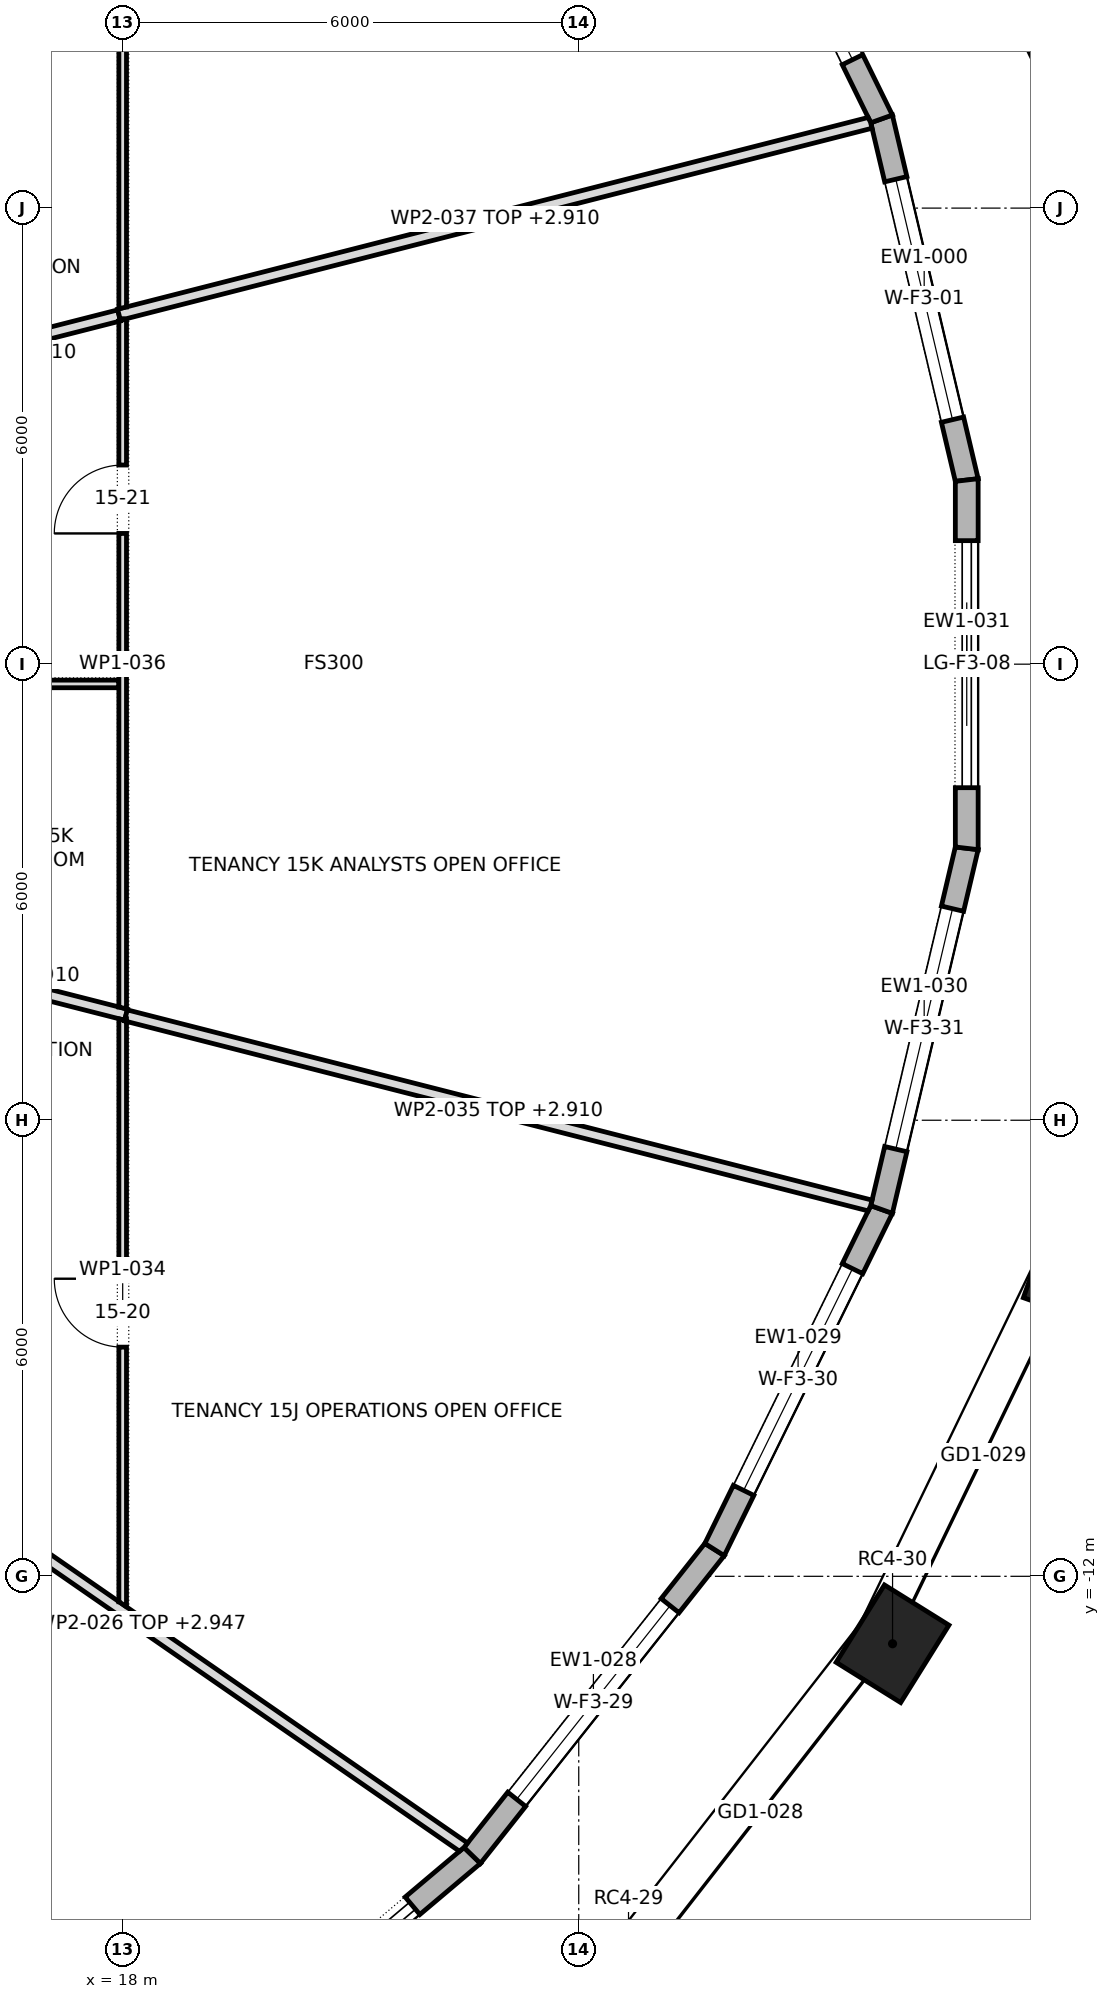
"""IFC4 building model, lengths in metres.
Left out: names, types, materials, properties, quantities, classifications, styles, units other than length and angle.
Written with IfcOpenShell. Run it as: python <this file> out.ifc"""

import sys

from ifc_helpers import new_model, si_unit, direction, frame, frame_2d, origin, origin_2d, place, context, subcontext, project, spatial, polyline, rectangle, outline, extrude, element, fill, save


model = new_model("IFC4")
c1 = context("Model", 3, precision=1e-05, world=origin(), true_north=direction((0.0, 1.0)))
c2 = subcontext(c1, "Body", "Model", "MODEL_VIEW")
j1 = project(units=[si_unit("LENGTHUNIT", "METRE"), si_unit("PLANEANGLEUNIT", "RADIAN")], contexts=[c1])
p1 = place(None, origin())
s1 = spatial("IfcSite", under=j1, at=p1, CompositionType="ELEMENT")
p2 = place(p1, origin())
s2 = spatial("IfcBuilding", under=s1, at=p2, CompositionType="ELEMENT")
p3 = place(p2, frame((0.0, 0.0, 214.9)))
s3 = spatial("IfcBuildingStorey", under=s2, at=p3, CompositionType="ELEMENT", Elevation=214.9)
for number, where, z_axis, x_axis in (
    (1, (30.521, 7.936, 0.0), (0.0, 0.0, 1.0), (-0.334, 0.943, 0.0)),
    (2, (28.129, -12.887, 0.0), (0.0, 0.0, 1.0), (0.529, 0.849, 0.0)),
    (3, (30.521, -7.936, 0.0), (0.0, 0.0, 1.0), (0.334, 0.943, 0.0)),
):
    element("IfcColumn", number, at=place(p3, frame(where, z_axis=z_axis, x_axis=x_axis)), inside=s3, PredefinedType="COLUMN", context=c2, shape_type="SweptSolid", body=[
        extrude(rectangle(XDim=1.2, YDim=1.0, at=origin_2d()), origin(), (0.0, 0.0, 1.0), 4.0),
    ])
p4 = place(p3, frame((29.104, 2.423, 0.0), z_axis=(0.0, 0.0, 1.0), x_axis=(-0.229546618766, 0.97329766763, 0.0)))
e4 = element("IfcWall", 4, at=p4, inside=s3, PredefinedType="STANDARD", context=c2, shape_type="SweptSolid", body=[
    extrude(outline(polyline([(-0.017, -0.15), (4.899, -0.15), (4.865, 0.15), (0.017, 0.15), (-0.017, -0.15)])), origin(), (0.0, 0.0, 1.0), 3.7),
])
p5 = place(p4, frame((0.816, 0.0, 0.6)))
e5 = element("IfcOpeningElement", 5, at=p5, cuts=e4, PredefinedType="OPENING", context=c2, shape_type="SweptSolid", body=[
    extrude(rectangle(XDim=3.25, YDim=2.65, at=frame_2d((1.625, 1.325))), frame((0.0, 0.162, 0.0), z_axis=(0.0, -1.0, 0.0), x_axis=(1.0, 0.0, 0.0)), (0.0, 0.0, 1.0), 0.324),
])
p6 = place(p3, frame((27.984, 7.174, 0.0), z_axis=(0.0, 0.0, 1.0), x_axis=(-0.440795186599, 0.897607711348, 0.0)))
e6 = element("IfcWall", 6, at=p6, inside=s3, PredefinedType="STANDARD", context=c2, shape_type="SweptSolid", body=[
    extrude(outline(polyline([(-0.017, -0.15), (5.0, -0.15), (4.968, 0.15), (0.017, 0.15), (-0.017, -0.15)])), origin(), (0.0, 0.0, 1.0), 3.7),
])
p7 = place(p6, frame((0.867, 0.0, 0.6)))
e7 = element("IfcOpeningElement", 7, at=p7, cuts=e6, PredefinedType="OPENING", context=c2, shape_type="SweptSolid", body=[
    extrude(rectangle(XDim=3.25, YDim=2.65, at=frame_2d((1.625, 1.325))), frame((0.0, 0.162, 0.0), z_axis=(0.0, -1.0, 0.0), x_axis=(1.0, 0.0, 0.0)), (0.0, 0.0, 1.0), 0.324),
])
p8 = place(p3, frame((18.543, -19.092, 0.0), z_axis=(0.0, 0.0, 1.0), x_axis=(0.764397795062, 0.644744919255, 0.0)))
e8 = element("IfcWall", 8, at=p8, inside=s3, PredefinedType="STANDARD", context=c2, shape_type="SweptSolid", body=[
    extrude(outline(polyline([(-0.014, -0.15), (5.32, -0.15), (5.29, 0.15), (0.014, 0.15), (-0.014, -0.15)])), origin(), (0.0, 0.0, 1.0), 3.7),
])
p9 = place(p8, frame((1.028, 0.0, 0.0)))
e9 = element("IfcOpeningElement", 9, at=p9, cuts=e8, PredefinedType="OPENING", context=c2, shape_type="SweptSolid", body=[
    extrude(rectangle(XDim=3.25, YDim=3.25, at=frame_2d((1.625, 1.625))), frame((0.0, 0.162, 0.0), z_axis=(0.0, -1.0, 0.0), x_axis=(1.0, 0.0, 0.0)), (0.0, 0.0, 1.0), 0.324),
])
p10 = place(p3, frame((22.599, -15.672, 0.0), z_axis=(0.0, 0.0, 1.0), x_axis=(0.621017151557, 0.783796974651, 0.0)))
e10 = element("IfcWall", 10, at=p10, inside=s3, PredefinedType="STANDARD", context=c2, shape_type="SweptSolid", body=[
    extrude(outline(polyline([(-0.015, -0.15), (5.15, -0.15), (5.118, 0.15), (0.015, 0.15), (-0.015, -0.15)])), origin(), (0.0, 0.0, 1.0), 3.7),
])
p11 = place(p10, frame((0.942, 0.0, 0.6)))
e11 = element("IfcOpeningElement", 11, at=p11, cuts=e10, PredefinedType="OPENING", context=c2, shape_type="SweptSolid", body=[
    extrude(rectangle(XDim=3.25, YDim=2.65, at=frame_2d((1.625, 1.325))), frame((0.0, 0.162, 0.0), z_axis=(0.0, -1.0, 0.0), x_axis=(1.0, 0.0, 0.0)), (0.0, 0.0, 1.0), 0.324),
])
p12 = place(p3, frame((25.787, -11.648, 0.0), z_axis=(0.0, 0.0, 1.0), x_axis=(0.440795186599, 0.897607711348, 0.0)))
e12 = element("IfcWall", 12, at=p12, inside=s3, PredefinedType="STANDARD", context=c2, shape_type="SweptSolid", body=[
    extrude(outline(polyline([(-0.016, -0.15), (5.001, -0.15), (4.967, 0.15), (0.016, 0.15), (-0.016, -0.15)])), origin(), (0.0, 0.0, 1.0), 3.7),
])
p13 = place(p12, frame((0.867, 0.0, 0.6)))
e13 = element("IfcOpeningElement", 13, at=p13, cuts=e12, PredefinedType="OPENING", context=c2, shape_type="SweptSolid", body=[
    extrude(rectangle(XDim=3.25, YDim=2.65, at=frame_2d((1.625, 1.325))), frame((0.0, 0.162, 0.0), z_axis=(0.0, -1.0, 0.0), x_axis=(1.0, 0.0, 0.0)), (0.0, 0.0, 1.0), 0.324),
])
p14 = place(p3, frame((27.984, -7.174, 0.0), z_axis=(0.0, 0.0, 1.0), x_axis=(0.229546618766, 0.97329766763, 0.0)))
e14 = element("IfcWall", 14, at=p14, inside=s3, PredefinedType="STANDARD", context=c2, shape_type="SweptSolid", body=[
    extrude(outline(polyline([(-0.017, -0.15), (4.899, -0.15), (4.865, 0.15), (0.017, 0.15), (-0.017, -0.15)])), origin(), (0.0, 0.0, 1.0), 3.7),
])
p15 = place(p14, frame((0.816, 0.0, 0.6)))
e15 = element("IfcOpeningElement", 15, at=p15, cuts=e14, PredefinedType="OPENING", context=c2, shape_type="SweptSolid", body=[
    extrude(rectangle(XDim=3.25, YDim=2.65, at=frame_2d((1.625, 1.325))), frame((0.0, 0.162, 0.0), z_axis=(0.0, -1.0, 0.0), x_axis=(1.0, 0.0, 0.0)), (0.0, 0.0, 1.0), 0.324),
])
p16 = place(p3, frame((29.104, -2.423, 0.0), z_axis=(0.0, 0.0, 1.0), x_axis=(0.0, 1.0, 0.0)))
e16 = element("IfcWall", 16, at=p16, inside=s3, PredefinedType="STANDARD", context=c2, shape_type="SweptSolid", body=[
    extrude(outline(polyline([(-0.017, -0.15), (4.863, -0.15), (4.828, 0.15), (0.017, 0.15), (-0.017, -0.15)])), origin(), (0.0, 0.0, 1.0), 3.7),
])
p17 = place(p16, frame((0.798, 0.0, 0.0)))
e17 = element("IfcOpeningElement", 17, at=p17, cuts=e16, PredefinedType="OPENING", context=c2, shape_type="SweptSolid", body=[
    extrude(rectangle(XDim=3.25, YDim=3.25, at=frame_2d((1.625, 1.625))), frame((0.0, 0.162, 0.0), z_axis=(0.0, -1.0, 0.0), x_axis=(1.0, 0.0, 0.0)), (0.0, 0.0, 1.0), 0.324),
])
p18 = place(p3, frame((13.968, -9.667, 0.0), z_axis=(0.0, 0.0, 1.0), x_axis=(0.822219313141, -0.56917080134, 0.0)))
e18 = element("IfcWall", 18, at=p18, inside=s3, PredefinedType="PARTITIONING", context=c2, shape_type="SweptSolid", body=[
    extrude(outline(polyline([(0.0, -0.075), (1.724, -0.075), (3.448, -0.075), (5.173, -0.075), (6.897, -0.075), (8.621, -0.075), (10.345, -0.075), (10.365, 0.0), (10.37, 0.066), (10.37, 0.075), (8.511, 0.075), (6.653, 0.075), (4.795, 0.075), (4.792, 0.073), (4.791, 0.075), (3.22, 0.075), (1.65, 0.075), (0.079, 0.075), (0.039, -0.0), (0.0, -0.075)])), origin(), (0.0, 0.0, 1.0), 2.947),
])
p19 = place(p3, frame((14.042, -3.591, 0.0), z_axis=(0.0, 0.0, 1.0), x_axis=(0.968991510142, -0.247094017071, 0.0)))
e19 = element("IfcWall", 19, at=p19, inside=s3, PredefinedType="PARTITIONING", context=c2, shape_type="SweptSolid", body=[
    extrude(outline(polyline([(4.131, 0.075), (4.015, 0.075), (4.014, 0.075), (4.014, 0.075), (2.676, 0.075), (1.338, 0.075), (0.0, 0.075), (0.0, 0.074), (0.015, 0.015), (0.03, 0.019), (0.053, -0.075), (1.413, -0.075), (2.772, -0.075), (4.131, -0.075), (4.131, 0.075)])), origin(), (0.0, 0.0, 1.0), 2.91),
])
p20 = place(p3, frame((14.061, -0.26, 0.0), z_axis=(0.0, 0.0, 1.0), x_axis=(1.0, 0.0, 0.0)))
e20 = element("IfcWall", 20, at=p20, inside=s3, PredefinedType="PARTITIONING", context=c2, shape_type="SweptSolid", body=[
    extrude(outline(polyline([(3.889, 0.05), (1.952, 0.05), (0.014, 0.05), (0.014, 0.0), (0.0, 0.0), (0.0, -0.05), (1.945, -0.05), (3.889, -0.05), (3.889, 0.05)])), origin(), (0.0, 0.0, 1.0), 3.7),
])
p21 = place(p3, frame((14.057, 3.594, 0.0), z_axis=(0.0, 0.0, 1.0), x_axis=(0.968992302027, 0.247090911634, 0.0)))
e21 = element("IfcWall", 21, at=p21, inside=s3, PredefinedType="PARTITIONING", context=c2, shape_type="SweptSolid", body=[
    extrude(outline(polyline([(0.0, -0.075), (2.0, -0.075), (3.999, -0.075), (3.999, -0.073), (4.005, -0.075), (4.021, -0.075), (4.021, 0.075), (2.029, 0.075), (0.038, 0.075), (0.0, -0.074), (0.0, -0.075)])), origin(), (0.0, 0.0, 1.0), 2.91),
])
p22 = place(p3, frame((18.0, -4.665, 0.0), z_axis=(0.0, 0.0, 1.0), x_axis=(0.0, -1.0, 0.0)))
e22 = element("IfcWall", 22, at=p22, inside=s3, PredefinedType="PARTITIONING", context=c2, shape_type="SweptSolid", body=[
    extrude(outline(polyline([(0.0, -0.05), (1.917, -0.05), (3.834, -0.05), (5.751, -0.05), (7.668, -0.05), (7.737, 0.05), (7.737, 0.05), (5.812, 0.05), (3.886, 0.05), (1.961, 0.05), (0.035, 0.05), (0.029, 0.025), (0.0, 0.032), (0.0, 0.031), (0.019, 0.026), (0.0, -0.048), (0.0, -0.05)])), origin(), (0.0, 0.0, 1.0), 3.7),
])
p23 = place(p22, frame((3.42, 0.0, 0.0)))
e23 = element("IfcOpeningElement", 23, at=p23, cuts=e22, PredefinedType="OPENING", context=c2, shape_type="SweptSolid", body=[
    extrude(rectangle(XDim=0.9, YDim=2.1, at=frame_2d((0.45, 1.05))), frame((0.0, 0.062, 0.0), z_axis=(0.0, -1.0, 0.0), x_axis=(1.0, 0.0, 0.0)), (0.0, 0.0, 1.0), 0.124),
])
p24 = place(p3, frame((18.042, -4.621, 0.0), z_axis=(0.0, 0.0, 1.0), x_axis=(0.968898746972, -0.247457507698, 0.0)))
e24 = element("IfcWall", 24, at=p24, inside=s3, PredefinedType="PARTITIONING", context=c2, shape_type="SweptSolid", body=[
    extrude(outline(polyline([(0.027, -0.075), (1.706, -0.075), (3.385, -0.075), (5.063, -0.075), (6.741, -0.075), (8.42, -0.075), (10.098, -0.075), (10.113, -0.008), (10.113, 0.075), (8.427, 0.075), (6.742, 0.075), (5.056, 0.075), (3.371, 0.075), (1.686, 0.075), (0.0, 0.075), (0.0, -0.045), (0.019, -0.041), (0.027, -0.075)])), origin(), (0.0, 0.0, 1.0), 2.91),
])
p25 = place(p3, frame((18.0, -4.535, 0.0), z_axis=(0.0, 0.0, 1.0), x_axis=(0.0, 1.0, 0.0)))
e25 = element("IfcWall", 25, at=p25, inside=s3, PredefinedType="PARTITIONING", context=c2, shape_type="SweptSolid", body=[
    extrude(outline(polyline([(9.08, -0.05), (9.08, -0.048), (9.06, 0.03), (9.08, 0.035), (9.08, 0.036), (9.05, 0.029), (9.045, 0.05), (7.471, 0.05), (5.898, 0.05), (4.325, 0.05), (4.325, 0.05), (4.225, 0.05), (4.225, 0.05), (2.825, 0.05), (1.425, 0.05), (0.025, 0.05), (0.0, -0.048), (0.0, -0.05), (1.816, -0.05), (3.632, -0.05), (5.448, -0.05), (7.264, -0.05), (9.08, -0.05)])), origin(), (0.0, 0.0, 1.0), 3.7),
])
p26 = place(p25, frame((6.255, 0.0, 0.0)))
e26 = element("IfcOpeningElement", 26, at=p26, cuts=e25, PredefinedType="OPENING", context=c2, shape_type="SweptSolid", body=[
    extrude(rectangle(XDim=0.9, YDim=2.1, at=frame_2d((0.45, 1.05))), frame((0.0, 0.062, 0.0), z_axis=(0.0, -1.0, 0.0), x_axis=(1.0, 0.0, 0.0)), (0.0, 0.0, 1.0), 0.124),
])
p27 = place(p3, frame((17.952, 4.598, 0.0), z_axis=(0.0, 0.0, 1.0), x_axis=(0.968895869382, 0.247468774381, 0.0)))
e27 = element("IfcWall", 27, at=p27, inside=s3, PredefinedType="PARTITIONING", context=c2, shape_type="SweptSolid", body=[
    extrude(outline(polyline([(10.206, -0.075), (10.206, 0.008), (10.192, 0.075), (8.513, 0.075), (6.835, 0.075), (5.156, 0.075), (3.478, 0.075), (1.799, 0.075), (0.121, 0.075), (0.121, 0.075), (0.12, 0.075), (0.0, 0.075), (0.0, -0.054), (0.081, -0.075), (1.768, -0.075), (3.456, -0.075), (5.143, -0.075), (6.831, -0.075), (8.518, -0.075), (10.206, -0.075)])), origin(), (0.0, 0.0, 1.0), 2.91),
])
p28 = place(p3, frame((18.0, 12.402, 0.0), z_axis=(0.0, 0.0, 1.0), x_axis=(0.0, -1.0, 0.0)))
e28 = element("IfcWall", 28, at=p28, inside=s3, PredefinedType="PARTITIONING", context=c2, shape_type="SweptSolid", body=[
    extrude(outline(polyline([(7.727, -0.05), (7.727, -0.048), (7.702, 0.05), (5.776, 0.05), (3.851, 0.05), (1.926, 0.05), (0.0, 0.05), (0.0, 0.05), (0.069, -0.05), (1.984, -0.05), (3.898, -0.05), (5.812, -0.05), (7.727, -0.05)])), origin(), (0.0, 0.0, 1.0), 3.7),
])
p29 = place(p28, frame((3.417, 0.0, 0.0)))
e29 = element("IfcOpeningElement", 29, at=p29, cuts=e28, PredefinedType="OPENING", context=c2, shape_type="SweptSolid", body=[
    extrude(rectangle(XDim=0.9, YDim=2.1, at=frame_2d((0.45, 1.05))), frame((0.0, 0.062, 0.0), z_axis=(0.0, -1.0, 0.0), x_axis=(1.0, 0.0, 0.0)), (0.0, 0.0, 1.0), 0.124),
])
p30 = place(p3, frame((18.459, -18.973, 0.0), z_axis=(0.0, 0.0, 1.0), x_axis=(-0.697374409368, 0.716707006494, 0.0)))
e30 = element("IfcWall", 30, at=p30, inside=s3, PredefinedType="PARTITIONING", context=c2, shape_type="SweptSolid", body=[
    extrude(outline(polyline([(0.0, -0.075), (1.743, -0.075), (3.485, -0.075), (5.228, -0.075), (6.971, -0.075), (6.939, 0.0), (6.907, 0.075), (5.187, 0.075), (3.466, 0.075), (1.746, 0.075), (0.025, 0.075), (0.005, -0.002), (0.0, -0.069), (0.0, -0.075)])), origin(), (0.0, 0.0, 1.0), 3.7),
])
p31 = place(p5, origin())
e31 = element("IfcWindow", 31, at=p31, inside=s3, PartitioningType="TRIPLE_PANEL_VERTICAL", PredefinedType="WINDOW", context=c2, shape_type="SweptSolid", body=[
    extrude(rectangle(XDim=3.25, YDim=2.65, at=frame_2d((1.625, 1.325))), frame((0.0, 0.03, 0.0), z_axis=(0.0, -1.0, 0.0), x_axis=(1.0, 0.0, 0.0)), (0.0, 0.0, 1.0), 0.06),
])
fill(e5, e31)
p32 = place(p7, origin())
e32 = element("IfcWindow", 32, at=p32, inside=s3, PartitioningType="TRIPLE_PANEL_VERTICAL", PredefinedType="WINDOW", context=c2, shape_type="SweptSolid", body=[
    extrude(rectangle(XDim=3.25, YDim=2.65, at=frame_2d((1.625, 1.325))), frame((0.0, 0.03, 0.0), z_axis=(0.0, -1.0, 0.0), x_axis=(1.0, 0.0, 0.0)), (0.0, 0.0, 1.0), 0.06),
])
fill(e7, e32)
p33 = place(p9, origin())
e33 = element("IfcDoor", 33, at=p33, inside=s3, OperationType="DOUBLE_DOOR_SLIDING", PredefinedType="DOOR", context=c2, shape_type="SweptSolid", body=[
    extrude(rectangle(XDim=3.25, YDim=3.25, at=frame_2d((1.625, 1.625))), frame((0.0, 0.025, 0.0), z_axis=(0.0, -1.0, 0.0), x_axis=(1.0, 0.0, 0.0)), (0.0, 0.0, 1.0), 0.05),
])
fill(e9, e33)
p34 = place(p11, origin())
e34 = element("IfcWindow", 34, at=p34, inside=s3, PartitioningType="TRIPLE_PANEL_VERTICAL", PredefinedType="WINDOW", context=c2, shape_type="SweptSolid", body=[
    extrude(rectangle(XDim=3.25, YDim=2.65, at=frame_2d((1.625, 1.325))), frame((0.0, 0.03, 0.0), z_axis=(0.0, -1.0, 0.0), x_axis=(1.0, 0.0, 0.0)), (0.0, 0.0, 1.0), 0.06),
])
fill(e11, e34)
p35 = place(p13, origin())
e35 = element("IfcWindow", 35, at=p35, inside=s3, PartitioningType="TRIPLE_PANEL_VERTICAL", PredefinedType="WINDOW", context=c2, shape_type="SweptSolid", body=[
    extrude(rectangle(XDim=3.25, YDim=2.65, at=frame_2d((1.625, 1.325))), frame((0.0, 0.03, 0.0), z_axis=(0.0, -1.0, 0.0), x_axis=(1.0, 0.0, 0.0)), (0.0, 0.0, 1.0), 0.06),
])
fill(e13, e35)
p36 = place(p15, origin())
e36 = element("IfcWindow", 36, at=p36, inside=s3, PartitioningType="TRIPLE_PANEL_VERTICAL", PredefinedType="WINDOW", context=c2, shape_type="SweptSolid", body=[
    extrude(rectangle(XDim=3.25, YDim=2.65, at=frame_2d((1.625, 1.325))), frame((0.0, 0.03, 0.0), z_axis=(0.0, -1.0, 0.0), x_axis=(1.0, 0.0, 0.0)), (0.0, 0.0, 1.0), 0.06),
])
fill(e15, e36)
p37 = place(p17, origin())
e37 = element("IfcDoor", 37, at=p37, inside=s3, OperationType="DOUBLE_DOOR_SLIDING", PredefinedType="DOOR", context=c2, shape_type="SweptSolid", body=[
    extrude(rectangle(XDim=3.25, YDim=3.25, at=frame_2d((1.625, 1.625))), frame((0.0, 0.025, 0.0), z_axis=(0.0, -1.0, 0.0), x_axis=(1.0, 0.0, 0.0)), (0.0, 0.0, 1.0), 0.05),
])
fill(e17, e37)
p38 = place(p23, frame((0.9, 0.0, 0.0), z_axis=(0.0, 0.0, 1.0), x_axis=(-1.0, 0.0, 0.0)))
e38 = element("IfcDoor", 38, at=p38, inside=s3, OperationType="SINGLE_SWING_LEFT", PredefinedType="DOOR", context=c2, shape_type="SweptSolid", body=[
    extrude(rectangle(XDim=0.9, YDim=2.1, at=frame_2d((0.45, 1.05))), frame((0.0, 0.025, 0.0), z_axis=(0.0, -1.0, 0.0), x_axis=(1.0, 0.0, 0.0)), (0.0, 0.0, 1.0), 0.05),
])
fill(e23, e38)
p39 = place(p26, origin())
e39 = element("IfcDoor", 39, at=p39, inside=s3, OperationType="SINGLE_SWING_RIGHT", PredefinedType="DOOR", context=c2, shape_type="SweptSolid", body=[
    extrude(rectangle(XDim=0.9, YDim=2.1, at=frame_2d((0.45, 1.05))), frame((0.0, 0.025, 0.0), z_axis=(0.0, -1.0, 0.0), x_axis=(1.0, 0.0, 0.0)), (0.0, 0.0, 1.0), 0.05),
])
fill(e26, e39)
save(model, sys.argv[1])
